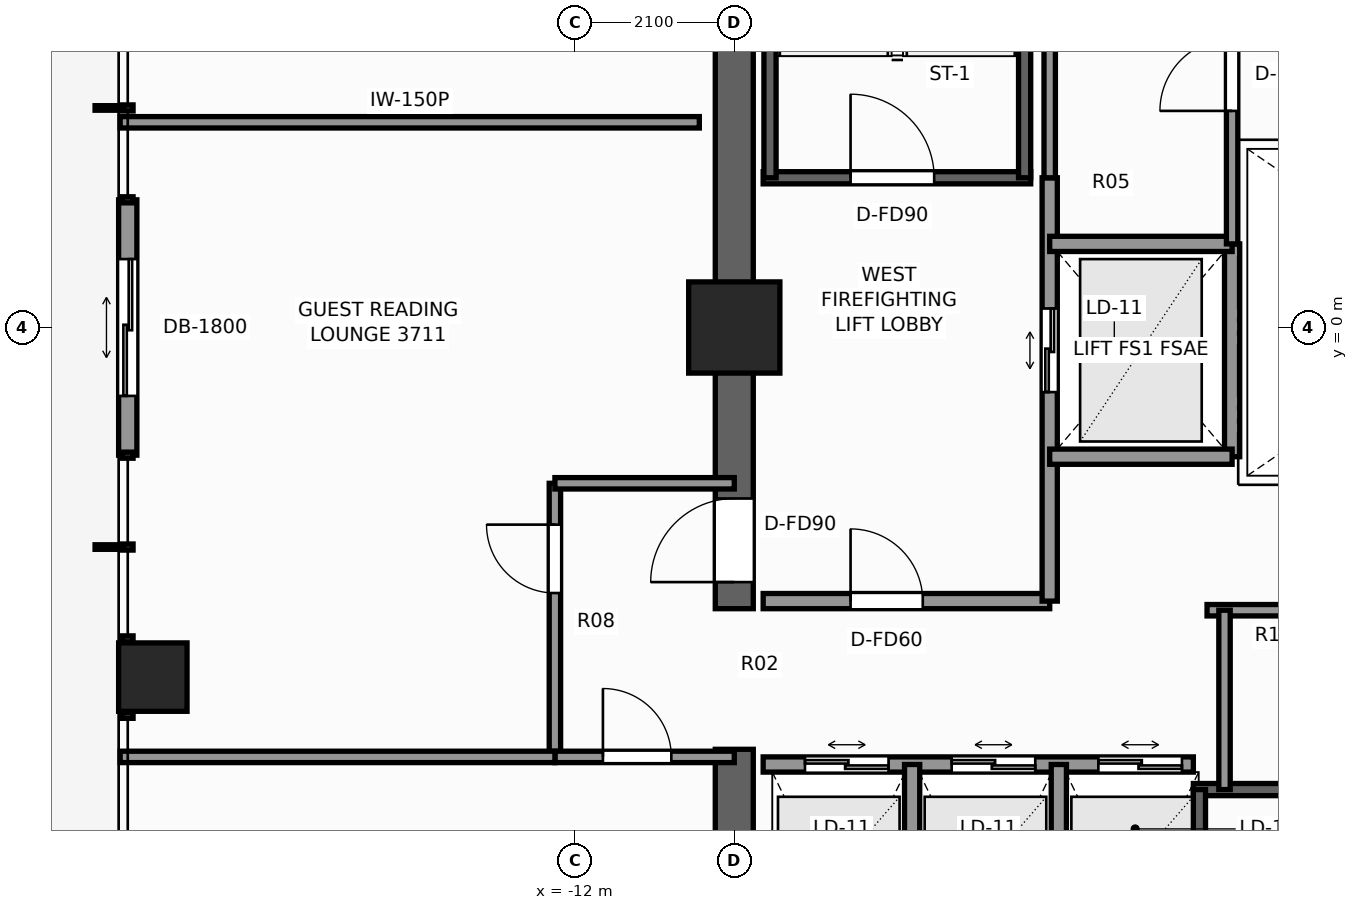
"""IFC4 building model, lengths in metres.
Left out: names, types, materials, properties, quantities, classifications, styles, units other than length and angle.
Written with IfcOpenShell. Run it as: python <this file> out.ifc"""

import sys

from ifc_helpers import new_model, si_unit, direction, frame, frame_2d, origin, origin_2d, place, context, subcontext, project, spatial, rectangle, extrude, element, fill, save


model = new_model("IFC4")
c1 = context("Model", 3, precision=1e-05, world=origin(), true_north=direction((0.0, 1.0)))
c2 = subcontext(c1, "Body", "Model", "MODEL_VIEW")
j1 = project(units=[si_unit("LENGTHUNIT", "METRE"), si_unit("PLANEANGLEUNIT", "RADIAN")], contexts=[c1])
p1 = place(None, origin())
s1 = spatial("IfcSite", under=j1, at=p1, CompositionType="ELEMENT")
p2 = place(p1, origin())
s2 = spatial("IfcBuilding", under=s1, at=p2, CompositionType="ELEMENT")
p3 = place(p2, frame((0.0, 0.0, 128.3)))
s3 = spatial("IfcBuildingStorey", under=s2, at=p3, CompositionType="ELEMENT", Elevation=128.3)
p4 = place(p3, frame((-9.9, -9.65, 0.0), z_axis=(0.0, 0.0, 1.0), x_axis=(0.0, 1.0, 0.0)))
e1 = element("IfcWall", 1, at=p4, inside=s3, PredefinedType="SHEAR", context=c2, shape_type="SweptSolid", body=[
    extrude(rectangle(XDim=4.1, YDim=0.5, at=frame_2d((2.05, 0.0))), origin(), (0.0, 0.0, 1.0), 3.3),
])
p5 = place(p3, frame((-9.9, -3.7, 0.0), z_axis=(0.0, 0.0, 1.0), x_axis=(0.0, 1.0, 0.0)))
e2 = element("IfcWall", 2, at=p5, inside=s3, PredefinedType="SHEAR", context=c2, shape_type="SweptSolid", body=[
    extrude(rectangle(XDim=13.35, YDim=0.5, at=frame_2d((6.675, 0.0))), origin(), (0.0, 0.0, 1.0), 3.3),
])
p6 = place(p5, frame((0.35, 0.0, 0.0)))
e3 = element("IfcOpeningElement", 3, at=p6, cuts=e2, PredefinedType="OPENING", context=c2, shape_type="SweptSolid", body=[
    extrude(rectangle(XDim=1.1, YDim=2.2, at=frame_2d((0.55, 1.1))), frame((0.0, 0.26, 0.0), z_axis=(0.0, -1.0, 0.0), x_axis=(1.0, 0.0, 0.0)), (0.0, 0.0, 1.0), 0.52),
])
p7 = place(p3, frame((-9.9, 0.0, 0.0), z_axis=(0.0, 0.0, 1.0), x_axis=(1.0, 0.0, 0.0)))
e4 = element("IfcColumn", 4, at=p7, inside=s3, PredefinedType="COLUMN", context=c2, shape_type="SweptSolid", body=[
    extrude(rectangle(XDim=1.2, YDim=1.2, at=origin_2d()), origin(), (0.0, 0.0, 1.0), 3.3),
])
p8 = place(p3, frame((-17.55, -4.6, 0.0), z_axis=(0.0, 0.0, 1.0), x_axis=(1.0, 0.0, 0.0)))
e5 = element("IfcColumn", 5, at=p8, inside=s3, PredefinedType="COLUMN", context=c2, shape_type="SweptSolid", body=[
    extrude(rectangle(XDim=0.9, YDim=0.9, at=origin_2d()), origin(), (0.0, 0.0, 1.0), 3.3),
])
p9 = place(p3, frame((-17.88, -1.68, 0.0), z_axis=(0.0, 0.0, 1.0), x_axis=(0.0, 1.0, 0.0)))
e6 = element("IfcWall", 6, at=p9, inside=s3, PredefinedType="STANDARD", context=c2, shape_type="SweptSolid", body=[
    extrude(rectangle(XDim=3.36, YDim=0.24, at=frame_2d((1.68, 0.0))), origin(), (0.0, 0.0, 1.0), 3.1),
])
p10 = place(p9, frame((0.78, 0.0, 0.0)))
e7 = element("IfcOpeningElement", 7, at=p10, cuts=e6, PredefinedType="OPENING", context=c2, shape_type="SweptSolid", body=[
    extrude(rectangle(XDim=1.8, YDim=2.2, at=frame_2d((0.9, 1.1))), frame((0.0, 0.13, 0.0), z_axis=(0.0, -1.0, 0.0), x_axis=(1.0, 0.0, 0.0)), (0.0, 0.0, 1.0), 0.26),
])
p11 = place(p3, frame((-9.52, 1.97, 0.0), z_axis=(0.0, 0.0, 1.0), x_axis=(1.0, 0.0, 0.0)))
e8 = element("IfcWall", 8, at=p11, inside=s3, PredefinedType="SHEAR", context=c2, shape_type="SweptSolid", body=[
    extrude(rectangle(XDim=3.52, YDim=0.16, at=frame_2d((1.76, 0.0))), origin(), (0.0, 0.0, 1.0), 3.3),
])
p12 = place(p11, frame((1.15, 0.0, 0.0)))
e9 = element("IfcOpeningElement", 9, at=p12, cuts=e8, PredefinedType="OPENING", context=c2, shape_type="SweptSolid", body=[
    extrude(rectangle(XDim=1.1, YDim=2.2, at=frame_2d((0.55, 1.1))), frame((0.0, 0.09, 0.0), z_axis=(0.0, -1.0, 0.0), x_axis=(1.0, 0.0, 0.0)), (0.0, 0.0, 1.0), 0.18),
])
for number, where, z_axis, x_axis in (
    (10, (-9.43, 1.97, 0.0), (0.0, 0.0, 1.0), (0.0, 1.0, 0.0)),
    (11, (-6.08, 1.97, 0.0), (0.0, 0.0, 1.0), (0.0, 1.0, 0.0)),
):
    element("IfcWall", number, at=place(p3, frame(where, z_axis=z_axis, x_axis=x_axis)), inside=s3, PredefinedType="SHEAR", context=c2, shape_type="SweptSolid", body=[
        extrude(rectangle(XDim=7.56, YDim=0.16, at=frame_2d((3.78, 0.0))), origin(), (0.0, 0.0, 1.0), 3.3),
    ])
p13 = place(p3, frame((-3.86, -6.08, 0.0), z_axis=(0.0, 0.0, 1.0), x_axis=(1.0, 0.0, 0.0)))
e12 = element("IfcWall", 12, at=p13, inside=s3, PredefinedType="SHEAR", context=c2, shape_type="SweptSolid", body=[
    extrude(rectangle(XDim=7.72, YDim=0.16, at=frame_2d((3.86, 0.0))), origin(), (0.0, 0.0, 1.0), 3.3),
])
p14 = place(p3, frame((-3.78, -9.43, 0.0), z_axis=(0.0, 0.0, 1.0), x_axis=(0.0, 1.0, 0.0)))
e13 = element("IfcWall", 13, at=p14, inside=s3, PredefinedType="SHEAR", context=c2, shape_type="SweptSolid", body=[
    extrude(rectangle(XDim=3.35, YDim=0.16, at=frame_2d((1.675, 0.0))), origin(), (0.0, 0.0, 1.0), 3.3),
])
p15 = place(p3, frame((-9.52, -3.6, 0.0), z_axis=(0.0, 0.0, 1.0), x_axis=(1.0, 0.0, 0.0)))
e14 = element("IfcWall", 14, at=p15, inside=s3, PredefinedType="SOLIDWALL", context=c2, shape_type="SweptSolid", body=[
    extrude(rectangle(XDim=3.77, YDim=0.2, at=frame_2d((1.885, 0.0))), origin(), (0.0, 0.0, 1.0), 3.1),
])
p16 = place(p15, frame((1.15, 0.0, 0.0)))
e15 = element("IfcOpeningElement", 15, at=p16, cuts=e14, PredefinedType="OPENING", context=c2, shape_type="SweptSolid", body=[
    extrude(rectangle(XDim=0.95, YDim=2.06, at=frame_2d((0.475, 1.03))), frame((0.0, 0.11, 0.0), z_axis=(0.0, -1.0, 0.0), x_axis=(1.0, 0.0, 0.0)), (0.0, 0.0, 1.0), 0.22),
])
p17 = place(p3, frame((-5.75, -3.6, 0.0), z_axis=(0.0, 0.0, 1.0), x_axis=(0.0, 1.0, 0.0)))
e16 = element("IfcWall", 16, at=p17, inside=s3, PredefinedType="SOLIDWALL", context=c2, shape_type="SweptSolid", body=[
    extrude(rectangle(XDim=5.57, YDim=0.2, at=frame_2d((2.785, 0.0))), origin(), (0.0, 0.0, 1.0), 2.735),
])
p18 = place(p17, frame((2.75, 0.0, 0.0)))
e17 = element("IfcOpeningElement", 17, at=p18, cuts=e16, PredefinedType="OPENING", context=c2, shape_type="SweptSolid", body=[
    extrude(rectangle(XDim=1.1, YDim=2.2, at=frame_2d((0.55, 1.1))), frame((0.0, 0.11, 0.0), z_axis=(0.0, -1.0, 0.0), x_axis=(1.0, 0.0, 0.0)), (0.0, 0.0, 1.0), 0.22),
])
p19 = place(p3, frame((-3.35, -1.7, 0.0), z_axis=(0.0, 0.0, 1.0), x_axis=(0.0, 1.0, 0.0)))
e18 = element("IfcWall", 18, at=p19, inside=s3, PredefinedType="SOLIDWALL", context=c2, shape_type="SweptSolid", body=[
    extrude(rectangle(XDim=2.8, YDim=0.2, at=frame_2d((1.4, 0.0))), origin(), (0.0, 0.0, 1.0), 2.735),
])
for number, where, z_axis, x_axis in (
    (19, (-5.75, -1.7, 0.0), (0.0, 0.0, 1.0), (1.0, 0.0, 0.0)),
    (20, (-5.75, 1.1, 0.0), (0.0, 0.0, 1.0), (1.0, 0.0, 0.0)),
):
    element("IfcWall", number, at=place(p3, frame(where, z_axis=z_axis, x_axis=x_axis)), inside=s3, PredefinedType="SOLIDWALL", context=c2, shape_type="SweptSolid", body=[
        extrude(rectangle(XDim=2.4, YDim=0.2, at=frame_2d((1.2, 0.0))), origin(), (0.0, 0.0, 1.0), 3.1),
    ])
p20 = place(p3, frame((-9.52, -5.75, 0.0), z_axis=(0.0, 0.0, 1.0), x_axis=(1.0, 0.0, 0.0)))
e21 = element("IfcWall", 21, at=p20, inside=s3, PredefinedType="SOLIDWALL", context=c2, shape_type="SweptSolid", body=[
    extrude(rectangle(XDim=5.66, YDim=0.2, at=frame_2d((2.83, 0.0))), origin(), (0.0, 0.0, 1.0), 3.1),
])
p21 = place(p20, frame((0.55, 0.0, 0.0)))
e22 = element("IfcOpeningElement", 22, at=p21, cuts=e21, PredefinedType="OPENING", context=c2, shape_type="SweptSolid", body=[
    extrude(rectangle(XDim=1.1, YDim=2.2, at=frame_2d((0.55, 1.1))), frame((0.0, 0.11, 0.0), z_axis=(0.0, -1.0, 0.0), x_axis=(1.0, 0.0, 0.0)), (0.0, 0.0, 1.0), 0.22),
])
p22 = place(p20, frame((2.48, 0.0, 0.0)))
e23 = element("IfcOpeningElement", 23, at=p22, cuts=e21, PredefinedType="OPENING", context=c2, shape_type="SweptSolid", body=[
    extrude(rectangle(XDim=1.1, YDim=2.2, at=frame_2d((0.55, 1.1))), frame((0.0, 0.11, 0.0), z_axis=(0.0, -1.0, 0.0), x_axis=(1.0, 0.0, 0.0)), (0.0, 0.0, 1.0), 0.22),
])
p23 = place(p20, frame((4.41, 0.0, 0.0)))
e24 = element("IfcOpeningElement", 24, at=p23, cuts=e21, PredefinedType="OPENING", context=c2, shape_type="SweptSolid", body=[
    extrude(rectangle(XDim=1.1, YDim=2.2, at=frame_2d((0.55, 1.1))), frame((0.0, 0.11, 0.0), z_axis=(0.0, -1.0, 0.0), x_axis=(1.0, 0.0, 0.0)), (0.0, 0.0, 1.0), 0.22),
])
for number, where, z_axis, x_axis in (
    (25, (-7.56, -9.52, 0.0), (0.0, 0.0, 1.0), (0.0, 1.0, 0.0)),
    (26, (-5.63, -9.52, 0.0), (0.0, 0.0, 1.0), (0.0, 1.0, 0.0)),
):
    element("IfcWall", number, at=place(p3, frame(where, z_axis=z_axis, x_axis=x_axis)), inside=s3, PredefinedType="SOLIDWALL", context=c2, shape_type="SweptSolid", body=[
        extrude(rectangle(XDim=3.77, YDim=0.2, at=frame_2d((1.885, 0.0))), origin(), (0.0, 0.0, 1.0), 3.1),
    ])
p24 = place(p3, frame((-3.68, -3.72, 0.0), z_axis=(0.0, 0.0, 1.0), x_axis=(1.0, 0.0, 0.0)))
e27 = element("IfcWall", 27, at=p24, inside=s3, PredefinedType="PARTITIONING", context=c2, shape_type="SweptSolid", body=[
    extrude(rectangle(XDim=7.36, YDim=0.15, at=frame_2d((3.68, 0.0))), origin(), (0.0, 0.0, 1.0), 3.1),
])
p25 = place(p3, frame((-3.45, -6.08, 0.0), z_axis=(0.0, 0.0, 1.0), x_axis=(0.0, 1.0, 0.0)))
e28 = element("IfcWall", 28, at=p25, inside=s3, PredefinedType="PARTITIONING", context=c2, shape_type="SweptSolid", body=[
    extrude(rectangle(XDim=2.36, YDim=0.15, at=frame_2d((1.18, 0.0))), origin(), (0.0, 0.0, 1.0), 3.1),
])
p26 = place(p3, frame((-3.35, 1.1, 0.0), z_axis=(0.0, 0.0, 1.0), x_axis=(0.0, 1.0, 0.0)))
e29 = element("IfcWall", 29, at=p26, inside=s3, PredefinedType="PARTITIONING", context=c2, shape_type="SweptSolid", body=[
    extrude(rectangle(XDim=3.2, YDim=0.15, at=frame_2d((1.6, 0.0))), origin(), (0.0, 0.0, 1.0), 2.735),
])
p27 = place(p26, frame((1.75, 0.0, 0.0)))
e30 = element("IfcOpeningElement", 30, at=p27, cuts=e29, PredefinedType="OPENING", context=c2, shape_type="SweptSolid", body=[
    extrude(rectangle(XDim=0.95, YDim=2.06, at=frame_2d((0.475, 1.03))), frame((0.0, 0.085, 0.0), z_axis=(0.0, -1.0, 0.0), x_axis=(1.0, 0.0, 0.0)), (0.0, 0.0, 1.0), 0.17),
])
p28 = place(p3, frame((-5.75, 1.97, 0.0), z_axis=(0.0, 0.0, 1.0), x_axis=(0.0, 1.0, 0.0)))
e31 = element("IfcWall", 31, at=p28, inside=s3, PredefinedType="PARTITIONING", context=c2, shape_type="SweptSolid", body=[
    extrude(rectangle(XDim=2.33, YDim=0.15, at=frame_2d((1.165, 0.0))), origin(), (0.0, 0.0, 1.0), 2.735),
])
p29 = place(p3, frame((-12.26, -5.65, 0.0), z_axis=(0.0, 0.0, 1.0), x_axis=(0.0, 1.0, 0.0)))
e32 = element("IfcWall", 32, at=p29, inside=s3, PredefinedType="PARTITIONING", context=c2, shape_type="SweptSolid", body=[
    extrude(rectangle(XDim=3.6, YDim=0.15, at=frame_2d((1.8, 0.0))), origin(), (0.0, 0.0, 1.0), 2.312),
])
p30 = place(p29, frame((2.156, 0.0, 0.0)))
e33 = element("IfcOpeningElement", 33, at=p30, cuts=e32, PredefinedType="OPENING", context=c2, shape_type="SweptSolid", body=[
    extrude(rectangle(XDim=0.9, YDim=2.06, at=frame_2d((0.45, 1.03))), frame((0.0, 0.085, 0.0), z_axis=(0.0, -1.0, 0.0), x_axis=(1.0, 0.0, 0.0)), (0.0, 0.0, 1.0), 0.17),
])
p31 = place(p3, frame((-12.26, -2.05, 0.0), z_axis=(0.0, 0.0, 1.0), x_axis=(1.0, 0.0, 0.0)))
e34 = element("IfcWall", 34, at=p31, inside=s3, PredefinedType="PARTITIONING", context=c2, shape_type="SweptSolid", body=[
    extrude(rectangle(XDim=2.36, YDim=0.15, at=frame_2d((1.18, 0.0))), origin(), (0.0, 0.0, 1.0), 3.1),
])
p32 = place(p3, frame((-12.26, -5.65, 0.0), z_axis=(0.0, 0.0, 1.0), x_axis=(1.0, 0.0, 0.0)))
e35 = element("IfcWall", 35, at=p32, inside=s3, PredefinedType="PARTITIONING", context=c2, shape_type="SweptSolid", body=[
    extrude(rectangle(XDim=2.36, YDim=0.15, at=frame_2d((1.18, 0.0))), origin(), (0.0, 0.0, 1.0), 3.1),
])
p33 = place(p32, frame((0.632, 0.0, 0.0)))
e36 = element("IfcOpeningElement", 36, at=p33, cuts=e35, PredefinedType="OPENING", context=c2, shape_type="SweptSolid", body=[
    extrude(rectangle(XDim=0.9, YDim=2.06, at=frame_2d((0.45, 1.03))), frame((0.0, 0.085, 0.0), z_axis=(0.0, -1.0, 0.0), x_axis=(1.0, 0.0, 0.0)), (0.0, 0.0, 1.0), 0.17),
])
p34 = place(p3, frame((-17.98, 2.7, 0.0), z_axis=(0.0, 0.0, 1.0), x_axis=(1.0, 0.0, 0.0)))
e37 = element("IfcWall", 37, at=p34, inside=s3, PredefinedType="PARTITIONING", context=c2, shape_type="SweptSolid", body=[
    extrude(rectangle(XDim=7.62, YDim=0.15, at=frame_2d((3.81, 0.0))), origin(), (0.0, 0.0, 1.0), 2.469),
])
p35 = place(p3, frame((-17.98, -5.65, 0.0), z_axis=(0.0, 0.0, 1.0), x_axis=(1.0, 0.0, 0.0)))
e38 = element("IfcWall", 38, at=p35, inside=s3, PredefinedType="PARTITIONING", context=c2, shape_type="SweptSolid", body=[
    extrude(rectangle(XDim=5.72, YDim=0.15, at=frame_2d((2.86, 0.0))), origin(), (0.0, 0.0, 1.0), 2.469),
])
p36 = place(p10, origin())
e39 = element("IfcDoor", 39, at=p36, inside=s3, OperationType="DOUBLE_DOOR_SLIDING", PredefinedType="DOOR", context=c2, shape_type="SweptSolid", body=[
    extrude(rectangle(XDim=1.8, YDim=2.2, at=frame_2d((0.9, 1.1))), frame((0.0, 0.025, 0.0), z_axis=(0.0, -1.0, 0.0), x_axis=(1.0, 0.0, 0.0)), (0.0, 0.0, 1.0), 0.05),
])
fill(e7, e39)
p37 = place(p12, origin())
e40 = element("IfcDoor", 40, at=p37, inside=s3, OperationType="SINGLE_SWING_LEFT", PredefinedType="DOOR", context=c2, shape_type="SweptSolid", body=[
    extrude(rectangle(XDim=1.1, YDim=2.2, at=frame_2d((0.55, 1.1))), frame((0.0, 0.025, 0.0), z_axis=(0.0, -1.0, 0.0), x_axis=(1.0, 0.0, 0.0)), (0.0, 0.0, 1.0), 0.05),
])
fill(e9, e40)
p38 = place(p6, origin())
e41 = element("IfcDoor", 41, at=p38, inside=s3, OperationType="SINGLE_SWING_LEFT", PredefinedType="DOOR", context=c2, shape_type="SweptSolid", body=[
    extrude(rectangle(XDim=1.1, YDim=2.2, at=frame_2d((0.55, 1.1))), frame((0.0, 0.025, 0.0), z_axis=(0.0, -1.0, 0.0), x_axis=(1.0, 0.0, 0.0)), (0.0, 0.0, 1.0), 0.05),
])
fill(e3, e41)
p39 = place(p18, origin())
e42 = element("IfcDoor", 42, at=p39, inside=s3, OperationType="DOUBLE_DOOR_SLIDING", PredefinedType="DOOR", context=c2, shape_type="SweptSolid", body=[
    extrude(rectangle(XDim=1.1, YDim=2.2, at=frame_2d((0.55, 1.1))), frame((0.0, 0.025, 0.0), z_axis=(0.0, -1.0, 0.0), x_axis=(1.0, 0.0, 0.0)), (0.0, 0.0, 1.0), 0.05),
])
fill(e17, e42)
p40 = place(p21, origin())
e43 = element("IfcDoor", 43, at=p40, inside=s3, OperationType="DOUBLE_DOOR_SLIDING", PredefinedType="DOOR", context=c2, shape_type="SweptSolid", body=[
    extrude(rectangle(XDim=1.1, YDim=2.2, at=frame_2d((0.55, 1.1))), frame((0.0, 0.025, 0.0), z_axis=(0.0, -1.0, 0.0), x_axis=(1.0, 0.0, 0.0)), (0.0, 0.0, 1.0), 0.05),
])
fill(e22, e43)
p41 = place(p22, origin())
e44 = element("IfcDoor", 44, at=p41, inside=s3, OperationType="DOUBLE_DOOR_SLIDING", PredefinedType="DOOR", context=c2, shape_type="SweptSolid", body=[
    extrude(rectangle(XDim=1.1, YDim=2.2, at=frame_2d((0.55, 1.1))), frame((0.0, 0.025, 0.0), z_axis=(0.0, -1.0, 0.0), x_axis=(1.0, 0.0, 0.0)), (0.0, 0.0, 1.0), 0.05),
])
fill(e23, e44)
p42 = place(p23, origin())
e45 = element("IfcDoor", 45, at=p42, inside=s3, OperationType="DOUBLE_DOOR_SLIDING", PredefinedType="DOOR", context=c2, shape_type="SweptSolid", body=[
    extrude(rectangle(XDim=1.1, YDim=2.2, at=frame_2d((0.55, 1.1))), frame((0.0, 0.025, 0.0), z_axis=(0.0, -1.0, 0.0), x_axis=(1.0, 0.0, 0.0)), (0.0, 0.0, 1.0), 0.05),
])
fill(e24, e45)
p43 = place(p16, origin())
e46 = element("IfcDoor", 46, at=p43, inside=s3, OperationType="SINGLE_SWING_LEFT", PredefinedType="DOOR", context=c2, shape_type="SweptSolid", body=[
    extrude(rectangle(XDim=0.95, YDim=2.06, at=frame_2d((0.475, 1.03))), frame((0.0, 0.025, 0.0), z_axis=(0.0, -1.0, 0.0), x_axis=(1.0, 0.0, 0.0)), (0.0, 0.0, 1.0), 0.05),
])
fill(e15, e46)
p44 = place(p27, origin())
e47 = element("IfcDoor", 47, at=p44, inside=s3, OperationType="SINGLE_SWING_LEFT", PredefinedType="DOOR", context=c2, shape_type="SweptSolid", body=[
    extrude(rectangle(XDim=0.95, YDim=2.06, at=frame_2d((0.475, 1.03))), frame((0.0, 0.025, 0.0), z_axis=(0.0, -1.0, 0.0), x_axis=(1.0, 0.0, 0.0)), (0.0, 0.0, 1.0), 0.05),
])
fill(e30, e47)
p45 = place(p30, origin())
e48 = element("IfcDoor", 48, at=p45, inside=s3, OperationType="SINGLE_SWING_RIGHT", PredefinedType="DOOR", context=c2, shape_type="SweptSolid", body=[
    extrude(rectangle(XDim=0.9, YDim=2.06, at=frame_2d((0.45, 1.03))), frame((0.0, 0.025, 0.0), z_axis=(0.0, -1.0, 0.0), x_axis=(1.0, 0.0, 0.0)), (0.0, 0.0, 1.0), 0.05),
])
fill(e33, e48)
p46 = place(p33, origin())
e49 = element("IfcDoor", 49, at=p46, inside=s3, OperationType="SINGLE_SWING_LEFT", PredefinedType="DOOR", context=c2, shape_type="SweptSolid", body=[
    extrude(rectangle(XDim=0.9, YDim=2.06, at=frame_2d((0.45, 1.03))), frame((0.0, 0.025, 0.0), z_axis=(0.0, -1.0, 0.0), x_axis=(1.0, 0.0, 0.0)), (0.0, 0.0, 1.0), 0.05),
])
fill(e36, e49)
save(model, sys.argv[1])
